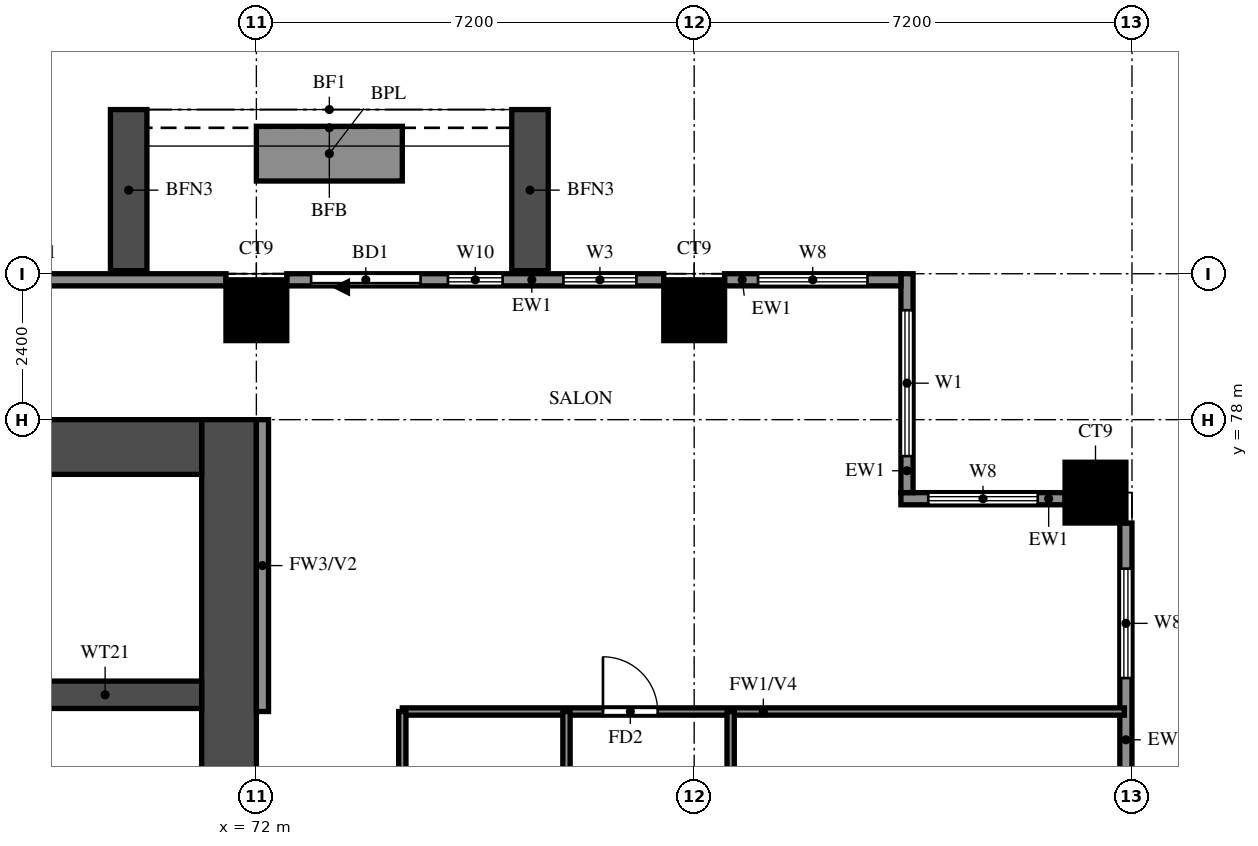
"""IFC4 building model, lengths in metres.
Left out: names, types, materials, properties, quantities, classifications, styles, units other than length and angle.
Written with IfcOpenShell. Run it as: python <this file> out.ifc"""

import sys

from ifc_helpers import new_model, si_unit, direction, frame, frame_2d, origin, origin_2d, place, context, subcontext, project, spatial, rectangle, extrude, source, transform, mapped, element, fill, save


model = new_model("IFC4")
c1 = context("Model", 3, precision=1e-05, world=origin(), true_north=direction((0.0, 1.0)))
c2 = subcontext(c1, "Body", "Model", "MODEL_VIEW")
j1 = project(units=[si_unit("LENGTHUNIT", "METRE"), si_unit("PLANEANGLEUNIT", "RADIAN")], contexts=[c1])
p1 = place(None, origin())
s1 = spatial("IfcSite", under=j1, at=p1, CompositionType="ELEMENT")
p2 = place(p1, origin())
s2 = spatial("IfcBuilding", under=s1, at=p2, CompositionType="ELEMENT")
p3 = place(p2, frame((0.0, 0.0, 90.0)))
s3 = spatial("IfcBuildingStorey", under=s2, at=p3, CompositionType="ELEMENT", Elevation=90.0)
m1 = source(origin(), c2, "Body", "SweptSolid", [
    extrude(rectangle(XDim=1.0, YDim=1.0, at=origin_2d()), origin(), (0.0, 0.0, 1.0), 3.18),
])
for number, where, z_axis, x_axis in (
    (1, (85.8, 76.8, 0.0), (0.0, 0.0, 1.0), (1.0, 0.0, 0.0)),
    (2, (72.0, 79.8, 0.0), (0.0, 0.0, 1.0), (1.0, 0.0, 0.0)),
    (3, (79.2, 79.8, 0.0), (0.0, 0.0, 1.0), (1.0, 0.0, 0.0)),
):
    element("IfcColumn", number, at=place(p3, frame(where, z_axis=z_axis, x_axis=x_axis)), inside=s3, PredefinedType="COLUMN", context=c2, shape_type="MappedRepresentation", body=[
        mapped(m1, transform((0.0, 0.0, 0.0))),
    ])
p4 = place(p3, frame((71.55, 66.0, 0.0), z_axis=(0.0, 0.0, 1.0), x_axis=(0.0, 1.0, 0.0)))
e4 = element("IfcWall", 4, at=p4, inside=s3, PredefinedType="SHEAR", context=c2, shape_type="SweptSolid", body=[
    extrude(rectangle(XDim=12.0, YDim=0.9, at=frame_2d((6.0, 0.0))), origin(), (0.0, 0.0, 1.0), 3.18),
])
p5 = place(p3, frame((29.7, 77.55, 0.0), z_axis=(0.0, 0.0, 1.0), x_axis=(1.0, 0.0, 0.0)))
e5 = element("IfcWall", 5, at=p5, inside=s3, PredefinedType="SHEAR", context=c2, shape_type="SweptSolid", body=[
    extrude(rectangle(XDim=41.4, YDim=0.9, at=frame_2d((20.7, 0.0))), origin(), (0.0, 0.0, 1.0), 3.18),
])
p6 = place(p3, frame((67.925, 73.475, 0.0), z_axis=(0.0, 0.0, 1.0), x_axis=(1.0, 0.0, 0.0)))
e6 = element("IfcWall", 6, at=p6, inside=s3, PredefinedType="SHEAR", context=c2, shape_type="SweptSolid", body=[
    extrude(rectangle(XDim=3.175, YDim=0.45, at=frame_2d((1.587, 0.0))), origin(), (0.0, 0.0, 1.0), 3.18),
])
p7 = place(p3, frame((86.3, 70.1, 0.0), z_axis=(0.0, 0.0, 1.0), x_axis=(0.0, 1.0, 0.0)))
e7 = element("IfcWall", 7, at=p7, inside=s3, PredefinedType="SOLIDWALL", context=c2, shape_type="SweptSolid", body=[
    extrude(rectangle(XDim=6.2, YDim=0.2, at=frame_2d((3.1, 0.0))), origin(), (0.0, 0.0, 1.0), 3.18),
])
p8 = place(p7, frame((1.2, 0.0, 1.5)))
e8 = element("IfcOpeningElement", 8, at=p8, cuts=e7, PredefinedType="OPENING", context=c2, shape_type="SweptSolid", body=[
    extrude(rectangle(XDim=0.9, YDim=0.9, at=frame_2d((0.45, 0.45))), frame((0.0, 0.11, 0.0), z_axis=(0.0, -1.0, 0.0), x_axis=(1.0, 0.0, 0.0)), (0.0, 0.0, 1.0), 0.22),
])
p9 = place(p7, frame((3.65, 0.0, 0.6)))
e9 = element("IfcOpeningElement", 9, at=p9, cuts=e7, PredefinedType="OPENING", context=c2, shape_type="SweptSolid", body=[
    extrude(rectangle(XDim=1.8, YDim=2.4, at=frame_2d((0.9, 1.2))), frame((0.0, 0.11, 0.0), z_axis=(0.0, -1.0, 0.0), x_axis=(1.0, 0.0, 0.0)), (0.0, 0.0, 1.0), 0.22),
])
p10 = place(p3, frame((85.3, 76.7, 0.0), z_axis=(0.0, 0.0, 1.0), x_axis=(-1.0, 0.0, 0.0)))
e10 = element("IfcWall", 10, at=p10, inside=s3, PredefinedType="SOLIDWALL", context=c2, shape_type="SweptSolid", body=[
    extrude(rectangle(XDim=2.7, YDim=0.2, at=frame_2d((1.35, 0.0))), origin(), (0.0, 0.0, 1.0), 3.18),
])
p11 = place(p10, frame((0.45, 0.0, 0.6)))
e11 = element("IfcOpeningElement", 11, at=p11, cuts=e10, PredefinedType="OPENING", context=c2, shape_type="SweptSolid", body=[
    extrude(rectangle(XDim=1.8, YDim=2.4, at=frame_2d((0.9, 1.2))), frame((0.0, 0.11, 0.0), z_axis=(0.0, -1.0, 0.0), x_axis=(1.0, 0.0, 0.0)), (0.0, 0.0, 1.0), 0.22),
])
p12 = place(p3, frame((82.7, 76.8, 0.0), z_axis=(0.0, 0.0, 1.0), x_axis=(0.0, 1.0, 0.0)))
e12 = element("IfcWall", 12, at=p12, inside=s3, PredefinedType="SOLIDWALL", context=c2, shape_type="SweptSolid", body=[
    extrude(rectangle(XDim=3.6, YDim=0.2, at=frame_2d((1.8, 0.0))), origin(), (0.0, 0.0, 1.0), 3.18),
])
p13 = place(p12, frame((0.6, 0.0, 0.6)))
e13 = element("IfcOpeningElement", 13, at=p13, cuts=e12, PredefinedType="OPENING", context=c2, shape_type="SweptSolid", body=[
    extrude(rectangle(XDim=2.4, YDim=2.4, at=frame_2d((1.2, 1.2))), frame((0.0, 0.11, 0.0), z_axis=(0.0, -1.0, 0.0), x_axis=(1.0, 0.0, 0.0)), (0.0, 0.0, 1.0), 0.22),
])
p14 = place(p3, frame((82.6, 80.3, 0.0), z_axis=(0.0, 0.0, 1.0), x_axis=(-1.0, 0.0, 0.0)))
e14 = element("IfcWall", 14, at=p14, inside=s3, PredefinedType="SOLIDWALL", context=c2, shape_type="SweptSolid", body=[
    extrude(rectangle(XDim=2.9, YDim=0.2, at=frame_2d((1.45, 0.0))), origin(), (0.0, 0.0, 1.0), 3.18),
])
p15 = place(p14, frame((0.55, 0.0, 0.6)))
e15 = element("IfcOpeningElement", 15, at=p15, cuts=e14, PredefinedType="OPENING", context=c2, shape_type="SweptSolid", body=[
    extrude(rectangle(XDim=1.8, YDim=2.4, at=frame_2d((0.9, 1.2))), frame((0.0, 0.11, 0.0), z_axis=(0.0, -1.0, 0.0), x_axis=(1.0, 0.0, 0.0)), (0.0, 0.0, 1.0), 0.22),
])
p16 = place(p3, frame((78.7, 80.3, 0.0), z_axis=(0.0, 0.0, 1.0), x_axis=(-1.0, 0.0, 0.0)))
e16 = element("IfcWall", 16, at=p16, inside=s3, PredefinedType="SOLIDWALL", context=c2, shape_type="SweptSolid", body=[
    extrude(rectangle(XDim=6.2, YDim=0.2, at=frame_2d((3.1, 0.0))), origin(), (0.0, 0.0, 1.0), 3.18),
])
p17 = place(p16, frame((4.0, 0.0, 0.0)))
e17 = element("IfcOpeningElement", 17, at=p17, cuts=e16, PredefinedType="OPENING", context=c2, shape_type="SweptSolid", body=[
    extrude(rectangle(XDim=1.8, YDim=2.4, at=frame_2d((0.9, 1.2))), frame((0.0, 0.11, 0.0), z_axis=(0.0, -1.0, 0.0), x_axis=(1.0, 0.0, 0.0)), (0.0, 0.0, 1.0), 0.22),
])
p18 = place(p16, frame((0.45, 0.0, 0.6)))
e18 = element("IfcOpeningElement", 18, at=p18, cuts=e16, PredefinedType="OPENING", context=c2, shape_type="SweptSolid", body=[
    extrude(rectangle(XDim=1.2, YDim=2.4, at=frame_2d((0.6, 1.2))), frame((0.0, 0.11, 0.0), z_axis=(0.0, -1.0, 0.0), x_axis=(1.0, 0.0, 0.0)), (0.0, 0.0, 1.0), 0.22),
])
p19 = place(p16, frame((2.65, 0.0, 0.6)))
e19 = element("IfcOpeningElement", 19, at=p19, cuts=e16, PredefinedType="OPENING", context=c2, shape_type="SweptSolid", body=[
    extrude(rectangle(XDim=0.9, YDim=2.4, at=frame_2d((0.45, 1.2))), frame((0.0, 0.11, 0.0), z_axis=(0.0, -1.0, 0.0), x_axis=(1.0, 0.0, 0.0)), (0.0, 0.0, 1.0), 0.22),
])
p20 = place(p3, frame((71.5, 80.3, 0.0), z_axis=(0.0, 0.0, 1.0), x_axis=(-1.0, 0.0, 0.0)))
e20 = element("IfcWall", 20, at=p20, inside=s3, PredefinedType="SOLIDWALL", context=c2, shape_type="SweptSolid", body=[
    extrude(rectangle(XDim=6.2, YDim=0.2, at=frame_2d((3.1, 0.0))), origin(), (0.0, 0.0, 1.0), 3.18),
])
for number, where, z_axis, x_axis in (
    (21, (76.5, 80.45, 0.0), (0.0, 0.0, 1.0), (0.0, 1.0, 0.0)),
    (22, (69.9, 80.45, 0.0), (0.0, 0.0, 1.0), (0.0, 1.0, 0.0)),
):
    element("IfcWall", number, at=place(p3, frame(where, z_axis=z_axis, x_axis=x_axis)), inside=s3, PredefinedType="SOLIDWALL", context=c2, shape_type="SweptSolid", body=[
        extrude(rectangle(XDim=2.65, YDim=0.6, at=frame_2d((1.325, 0.0))), origin(), (0.0, 0.0, 1.0), 2.85),
    ])
p21 = place(p3, frame((74.4, 82.375, 0.0), z_axis=(0.0, 0.0, 1.0), x_axis=(-1.0, 0.0, 0.0)))
e23 = element("IfcWall", 23, at=p21, inside=s3, PredefinedType="SOLIDWALL", context=c2, shape_type="SweptSolid", body=[
    extrude(rectangle(XDim=2.4, YDim=0.9, at=frame_2d((1.2, 0.0))), origin(), (0.0, 0.0, 1.0), 0.9),
])
p22 = place(p3, frame((72.1, 73.2, 0.0), z_axis=(0.0, 0.0, 1.0), x_axis=(0.0, 1.0, 0.0)))
e24 = element("IfcWall", 24, at=p22, inside=s3, PredefinedType="SOLIDWALL", context=c2, shape_type="SweptSolid", body=[
    extrude(rectangle(XDim=4.8, YDim=0.2, at=frame_2d((2.4, 0.0))), origin(), (0.0, 0.0, 1.0), 3.18),
])
p23 = place(p3, frame((74.4, 73.2, 0.0), z_axis=(0.0, 0.0, 1.0), x_axis=(1.0, 0.0, 0.0)))
e25 = element("IfcWall", 25, at=p23, inside=s3, PredefinedType="PARTITIONING", context=c2, shape_type="SweptSolid", body=[
    extrude(rectangle(XDim=11.875, YDim=0.12, at=frame_2d((5.938, 0.0))), origin(), (0.0, 0.0, 1.0), 2.28),
])
p24 = place(p23, frame((3.3, 0.0, 0.0)))
e26 = element("IfcOpeningElement", 26, at=p24, cuts=e25, PredefinedType="OPENING", context=c2, shape_type="SweptSolid", body=[
    extrude(rectangle(XDim=0.9, YDim=2.1, at=frame_2d((0.45, 1.05))), frame((0.0, 0.07, 0.0), z_axis=(0.0, -1.0, 0.0), x_axis=(1.0, 0.0, 0.0)), (0.0, 0.0, 1.0), 0.14),
])
p25 = place(p3, frame((74.4, 68.6, 0.0), z_axis=(0.0, 0.0, 1.0), x_axis=(0.0, 1.0, 0.0)))
e27 = element("IfcWall", 27, at=p25, inside=s3, PredefinedType="PARTITIONING", context=c2, shape_type="SweptSolid", body=[
    extrude(rectangle(XDim=4.6, YDim=0.12, at=frame_2d((2.3, 0.0))), origin(), (0.0, 0.0, 1.0), 3.18),
])
p26 = place(p3, frame((77.1, 61.2, 0.0), z_axis=(0.0, 0.0, 1.0), x_axis=(0.0, 1.0, 0.0)))
e28 = element("IfcWall", 28, at=p26, inside=s3, PredefinedType="PARTITIONING", context=c2, shape_type="SweptSolid", body=[
    extrude(rectangle(XDim=12.0, YDim=0.12, at=frame_2d((6.0, 0.0))), origin(), (0.0, 0.0, 1.0), 3.18),
])
p27 = place(p26, frame((4.55, 0.0, 0.0)))
e29 = element("IfcOpeningElement", 29, at=p27, cuts=e28, PredefinedType="OPENING", context=c2, shape_type="SweptSolid", body=[
    extrude(rectangle(XDim=0.9, YDim=2.1, at=frame_2d((0.45, 1.05))), frame((0.0, 0.07, 0.0), z_axis=(0.0, -1.0, 0.0), x_axis=(1.0, 0.0, 0.0)), (0.0, 0.0, 1.0), 0.14),
])
p28 = place(p26, frame((9.3, 0.0, 0.0)))
e30 = element("IfcOpeningElement", 30, at=p28, cuts=e28, PredefinedType="OPENING", context=c2, shape_type="SweptSolid", body=[
    extrude(rectangle(XDim=0.8, YDim=2.1, at=frame_2d((0.4, 1.05))), frame((0.0, 0.07, 0.0), z_axis=(0.0, -1.0, 0.0), x_axis=(1.0, 0.0, 0.0)), (0.0, 0.0, 1.0), 0.14),
])
p29 = place(p3, frame((79.8, 69.6, 0.0), z_axis=(0.0, 0.0, 1.0), x_axis=(0.0, 1.0, 0.0)))
e31 = element("IfcWall", 31, at=p29, inside=s3, PredefinedType="PARTITIONING", context=c2, shape_type="SweptSolid", body=[
    extrude(rectangle(XDim=3.6, YDim=0.12, at=frame_2d((1.8, 0.0))), origin(), (0.0, 0.0, 1.0), 3.18),
])
p30 = place(p9, origin())
e32 = element("IfcWindow", 32, at=p30, inside=s3, PartitioningType="DOUBLE_PANEL_VERTICAL", PredefinedType="WINDOW", context=c2, shape_type="SweptSolid", body=[
    extrude(rectangle(XDim=1.8, YDim=2.4, at=frame_2d((0.9, 1.2))), frame((0.0, 0.03, 0.0), z_axis=(0.0, -1.0, 0.0), x_axis=(1.0, 0.0, 0.0)), (0.0, 0.0, 1.0), 0.06),
])
fill(e9, e32)
p31 = place(p11, origin())
e33 = element("IfcWindow", 33, at=p31, inside=s3, PartitioningType="DOUBLE_PANEL_VERTICAL", PredefinedType="WINDOW", context=c2, shape_type="SweptSolid", body=[
    extrude(rectangle(XDim=1.8, YDim=2.4, at=frame_2d((0.9, 1.2))), frame((0.0, 0.03, 0.0), z_axis=(0.0, -1.0, 0.0), x_axis=(1.0, 0.0, 0.0)), (0.0, 0.0, 1.0), 0.06),
])
fill(e11, e33)
p32 = place(p13, origin())
e34 = element("IfcWindow", 34, at=p32, inside=s3, PartitioningType="DOUBLE_PANEL_VERTICAL", PredefinedType="WINDOW", context=c2, shape_type="SweptSolid", body=[
    extrude(rectangle(XDim=2.4, YDim=2.4, at=frame_2d((1.2, 1.2))), frame((0.0, 0.03, 0.0), z_axis=(0.0, -1.0, 0.0), x_axis=(1.0, 0.0, 0.0)), (0.0, 0.0, 1.0), 0.06),
])
fill(e13, e34)
p33 = place(p15, origin())
e35 = element("IfcWindow", 35, at=p33, inside=s3, PartitioningType="DOUBLE_PANEL_VERTICAL", PredefinedType="WINDOW", context=c2, shape_type="SweptSolid", body=[
    extrude(rectangle(XDim=1.8, YDim=2.4, at=frame_2d((0.9, 1.2))), frame((0.0, 0.03, 0.0), z_axis=(0.0, -1.0, 0.0), x_axis=(1.0, 0.0, 0.0)), (0.0, 0.0, 1.0), 0.06),
])
fill(e15, e35)
p34 = place(p17, origin())
e36 = element("IfcDoor", 36, at=p34, inside=s3, OperationType="DOUBLE_DOOR_SLIDING", PredefinedType="DOOR", context=c2, shape_type="SweptSolid", body=[
    extrude(rectangle(XDim=1.8, YDim=2.4, at=frame_2d((0.9, 1.2))), frame((0.0, 0.025, 0.0), z_axis=(0.0, -1.0, 0.0), x_axis=(1.0, 0.0, 0.0)), (0.0, 0.0, 1.0), 0.05),
])
fill(e17, e36)
p35 = place(p18, origin())
e37 = element("IfcWindow", 37, at=p35, inside=s3, PartitioningType="SINGLE_PANEL", PredefinedType="WINDOW", context=c2, shape_type="SweptSolid", body=[
    extrude(rectangle(XDim=1.2, YDim=2.4, at=frame_2d((0.6, 1.2))), frame((0.0, 0.03, 0.0), z_axis=(0.0, -1.0, 0.0), x_axis=(1.0, 0.0, 0.0)), (0.0, 0.0, 1.0), 0.06),
])
fill(e18, e37)
p36 = place(p19, origin())
e38 = element("IfcWindow", 38, at=p36, inside=s3, PartitioningType="SINGLE_PANEL", PredefinedType="WINDOW", context=c2, shape_type="SweptSolid", body=[
    extrude(rectangle(XDim=0.9, YDim=2.4, at=frame_2d((0.45, 1.2))), frame((0.0, 0.03, 0.0), z_axis=(0.0, -1.0, 0.0), x_axis=(1.0, 0.0, 0.0)), (0.0, 0.0, 1.0), 0.06),
])
fill(e19, e38)
p37 = place(p24, origin())
e39 = element("IfcDoor", 39, at=p37, inside=s3, OperationType="SINGLE_SWING_RIGHT", PredefinedType="DOOR", context=c2, shape_type="SweptSolid", body=[
    extrude(rectangle(XDim=0.9, YDim=2.1, at=frame_2d((0.45, 1.05))), frame((0.0, 0.025, 0.0), z_axis=(0.0, -1.0, 0.0), x_axis=(1.0, 0.0, 0.0)), (0.0, 0.0, 1.0), 0.05),
])
fill(e26, e39)
save(model, sys.argv[1])
